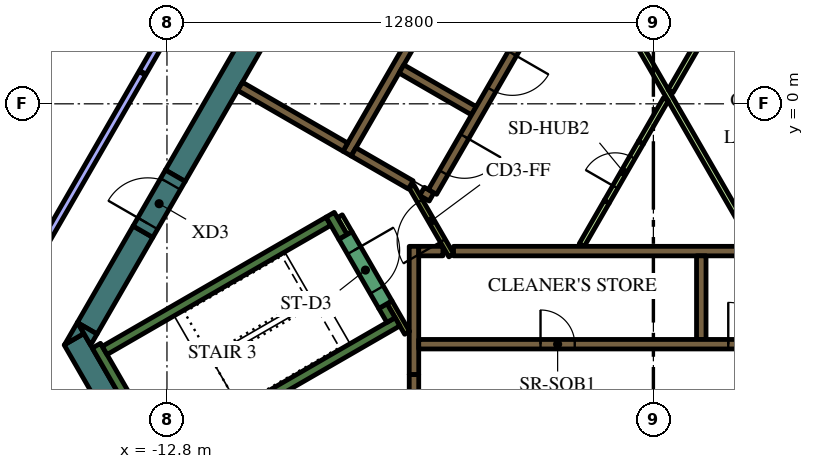
"""IFC4 building model, lengths in metres.
Left out: names, types, materials, properties, quantities, classifications, styles, units other than length and angle.
Written with IfcOpenShell. Run it as: python <this file> out.ifc"""

import sys

from ifc_helpers import new_model, si_unit, direction, frame, frame_2d, origin, place, context, subcontext, project, spatial, polyline, rectangle, outline, extrude, element, fill, save


model = new_model("IFC4")
c1 = context("Model", 3, precision=1e-05, world=origin(), true_north=direction((0.0, 1.0)))
c2 = subcontext(c1, "Body", "Model", "MODEL_VIEW")
j1 = project(units=[si_unit("LENGTHUNIT", "METRE"), si_unit("PLANEANGLEUNIT", "RADIAN")], contexts=[c1])
p1 = place(None, origin())
s1 = spatial("IfcSite", under=j1, at=p1, CompositionType="ELEMENT")
p2 = place(p1, origin())
s2 = spatial("IfcBuilding", under=s1, at=p2, CompositionType="ELEMENT")
p3 = place(p2, frame((0.0, 0.0, 279.6)))
s3 = spatial("IfcBuildingStorey", under=s2, at=p3, CompositionType="ELEMENT", Elevation=279.6)
p4 = place(p3, frame((-13.333, -9.506, 0.0), z_axis=(0.0, 0.0, 1.0), x_axis=(-0.500019073792, 0.866014391245, 0.0)))
e1 = element("IfcWall", 1, at=p4, inside=s3, PredefinedType="SOLIDWALL", context=c2, shape_type="SweptSolid", body=[
    extrude(rectangle(XDim=3.823, YDim=0.6, at=frame_2d((1.912, 0.0))), origin(), (0.0, 0.0, 1.0), 4.2),
])
p5 = place(p3, origin())
e2 = element("IfcWall", 2, at=p5, inside=s3, PredefinedType="SOLIDWALL", context=c2, shape_type="SweptSolid", body=[
    extrude(outline(polyline([(-14.987, -6.043), (-15.493, -6.335), (-15.156, -5.75), (-14.987, -6.043)])), origin(), (0.0, 0.0, 1.0), 4.2),
])
p6 = place(p3, frame((-13.432, -3.364, 0.0), z_axis=(0.0, 0.0, 1.0), x_axis=(-0.499960127962, -0.866048422692, 0.0)))
e3 = element("IfcWall", 3, at=p6, inside=s3, PredefinedType="SOLIDWALL", context=c2, shape_type="SweptSolid", body=[
    extrude(rectangle(XDim=2.934, YDim=0.6, at=frame_2d((1.467, 0.0))), origin(), (0.0, 0.0, 1.0), 4.2),
])
e4 = element("IfcWall", 4, at=p5, inside=s3, PredefinedType="SOLIDWALL", context=c2, shape_type="SweptSolid", body=[
    extrude(outline(polyline([(-14.809, -6.35), (-15.147, -5.764), (-14.64, -6.057), (-14.809, -6.35)])), origin(), (0.0, 0.0, 1.0), 4.2),
])
p7 = place(p3, frame((-4.234, 12.566, 0.0), z_axis=(0.0, 0.0, 1.0), x_axis=(-0.499998841866, -0.866026072432, 0.0)))
e5 = element("IfcWall", 5, at=p7, inside=s3, PredefinedType="SOLIDWALL", context=c2, shape_type="SweptSolid", body=[
    extrude(rectangle(XDim=16.694, YDim=0.6, at=frame_2d((8.347, 0.0))), origin(), (0.0, 0.0, 1.0), 4.2),
])
p8 = place(p3, frame((-12.84, -9.511, 0.0), z_axis=(0.0, 0.0, 1.0), x_axis=(-0.499997733992, 0.866026712061, 0.0)))
e6 = element("IfcWall", 6, at=p8, inside=s3, PredefinedType="SOLIDWALL", context=c2, shape_type="SweptSolid", body=[
    extrude(rectangle(XDim=3.634, YDim=0.25, at=frame_2d((1.817, 0.0))), origin(), (0.0, 0.0, 1.0), 4.2),
])
p9 = place(p3, frame((-14.44, -6.49, 0.0), z_axis=(0.0, 0.0, 1.0), x_axis=(0.866022966069, 0.500004222222, 0.0)))
e7 = element("IfcWall", 7, at=p9, inside=s3, PredefinedType="SOLIDWALL", context=c2, shape_type="SweptSolid", body=[
    extrude(rectangle(XDim=6.8, YDim=0.25, at=frame_2d((3.4, 0.0))), origin(), (0.0, 0.0, 1.0), 4.2),
])
p10 = place(p3, frame((-8.168, -3.503, 0.0), z_axis=(0.0, 0.0, 1.0), x_axis=(-0.499952099219, 0.866053057547, 0.0)))
e8 = element("IfcWall", 8, at=p10, inside=s3, PredefinedType="SOLIDWALL", context=c2, shape_type="SweptSolid", body=[
    extrude(rectangle(XDim=0.675, YDim=0.25, at=frame_2d((0.337, 0.0))), origin(), (0.0, 0.0, 1.0), 4.2),
])
p11 = place(p3, frame((-12.84, -9.261, 0.0), z_axis=(0.0, 0.0, 1.0), x_axis=(0.866016039709, 0.500016218704, 0.0)))
e9 = element("IfcWall", 9, at=p11, inside=s3, PredefinedType="SOLIDWALL", context=c2, shape_type="SweptSolid", body=[
    extrude(rectangle(XDim=7.05, YDim=0.25, at=frame_2d((3.525, 0.0))), origin(), (0.0, 0.0, 1.0), 4.2),
])
p12 = place(p3, frame((-6.905, -5.69, 0.0), z_axis=(0.0, 0.0, 1.0), x_axis=(-0.500402024738, 0.865793170242, 0.0)))
e10 = element("IfcWall", 10, at=p12, inside=s3, PredefinedType="SOLIDWALL", context=c2, shape_type="SweptSolid", body=[
    extrude(rectangle(XDim=0.425, YDim=0.25, at=frame_2d((0.212, 0.0))), origin(), (0.0, 0.0, 1.0), 4.2),
])
p13 = place(p3, frame((-5.259, -3.875, 0.0), z_axis=(0.0, 0.0, 1.0), x_axis=(1.0, 0.0, 0.0)))
e11 = element("IfcWall", 11, at=p13, inside=s3, PredefinedType="SOLIDWALL", context=c2, shape_type="SweptSolid", body=[
    extrude(rectangle(XDim=10.489, YDim=0.25, at=frame_2d((5.244, 0.0))), origin(), (0.0, 0.0, 1.0), 4.2),
])
p14 = place(p3, frame((1.26, -4.0, 0.0), z_axis=(0.0, 0.0, 1.0), x_axis=(0.0, -1.0, 0.0)))
e12 = element("IfcWall", 12, at=p14, inside=s3, PredefinedType="SOLIDWALL", context=c2, shape_type="SweptSolid", body=[
    extrude(rectangle(XDim=2.2, YDim=0.25, at=frame_2d((1.1, 0.0))), origin(), (0.0, 0.0, 1.0), 4.2),
])
p15 = place(p3, frame((-6.3, -7.125, 0.0), z_axis=(0.0, 0.0, 1.0), x_axis=(0.0, 1.0, 0.0)))
e13 = element("IfcWall", 13, at=p15, inside=s3, PredefinedType="SOLIDWALL", context=c2, shape_type="SweptSolid", body=[
    extrude(rectangle(XDim=3.375, YDim=0.25, at=frame_2d((1.687, 0.0))), origin(), (0.0, 0.0, 1.0), 4.2),
])
p16 = place(p3, frame((-6.175, -3.875, 0.0), z_axis=(0.0, 0.0, 1.0), x_axis=(1.0, 0.0, 0.0)))
e14 = element("IfcWall", 14, at=p16, inside=s3, PredefinedType="SOLIDWALL", context=c2, shape_type="SweptSolid", body=[
    extrude(rectangle(XDim=0.637, YDim=0.25, at=frame_2d((0.318, 0.0))), origin(), (0.0, 0.0, 1.0), 4.2),
])
p17 = place(p3, frame((5.97, -2.591, 0.0), z_axis=(0.0, 0.0, 1.0), x_axis=(-0.499994469932, 0.866028596547, 0.0)))
e15 = element("IfcWall", 15, at=p17, inside=s3, PredefinedType="SOLIDWALL", context=c2, shape_type="SweptSolid", body=[
    extrude(rectangle(XDim=10.488, YDim=0.25, at=frame_2d((5.244, 0.0))), origin(), (0.0, 0.0, 1.0), 4.2),
])
p18 = place(p3, frame((-3.02, 7.419, 0.0), z_axis=(0.0, 0.0, 1.0), x_axis=(-0.500022956343, -0.866012149528, 0.0)))
e16 = element("IfcWall", 16, at=p18, inside=s3, PredefinedType="SOLIDWALL", context=c2, shape_type="SweptSolid", body=[
    extrude(rectangle(XDim=10.08, YDim=0.25, at=frame_2d((5.04, 0.0))), origin(), (0.0, 0.0, 1.0), 4.2),
])
p19 = place(p3, frame((-4.724, -0.182, 0.0), z_axis=(0.0, 0.0, 1.0), x_axis=(-0.866008176907, 0.50002983664, 0.0)))
e17 = element("IfcWall", 17, at=p19, inside=s3, PredefinedType="SOLIDWALL", context=c2, shape_type="SweptSolid", body=[
    extrude(rectangle(XDim=2.2, YDim=0.25, at=frame_2d((1.1, 0.0))), origin(), (0.0, 0.0, 1.0), 4.2),
])
p20 = place(p3, frame((-6.088, -2.305, 0.0), z_axis=(0.0, 0.0, 1.0), x_axis=(0.866059450854, -0.499941024108, 0.0)))
e18 = element("IfcWall", 18, at=p20, inside=s3, PredefinedType="SOLIDWALL", context=c2, shape_type="SweptSolid", body=[
    extrude(rectangle(XDim=0.29, YDim=0.25, at=frame_2d((0.145, 0.0))), origin(), (0.0, 0.0, 1.0), 4.2),
])
p21 = place(p3, frame((-7.889, -1.265, 0.0), z_axis=(0.0, 0.0, 1.0), x_axis=(0.865986741702, -0.500066958712, 0.0)))
e19 = element("IfcWall", 19, at=p21, inside=s3, PredefinedType="SOLIDWALL", context=c2, shape_type="SweptSolid", body=[
    extrude(rectangle(XDim=1.738, YDim=0.25, at=frame_2d((0.869, 0.0))), origin(), (0.0, 0.0, 1.0), 4.2),
])
p22 = place(p3, frame((-8.106, -1.14, 0.0), z_axis=(0.0, 0.0, 1.0), x_axis=(-0.866008981251, 0.500028443584, 0.0)))
e20 = element("IfcWall", 20, at=p22, inside=s3, PredefinedType="SOLIDWALL", context=c2, shape_type="SweptSolid", body=[
    extrude(rectangle(XDim=3.2, YDim=0.25, at=frame_2d((1.6, 0.0))), origin(), (0.0, 0.0, 1.0), 4.2),
])
p23 = place(p3, frame((-8.252, -2.958, 0.0), z_axis=(0.0, 0.0, 1.0), x_axis=(0.500174715838, -0.865924508047, 0.0)))
e21 = element("IfcWall", 21, at=p23, inside=s3, PredefinedType="PARTITIONING", context=c2, shape_type="SweptSolid", body=[
    extrude(rectangle(XDim=0.514, YDim=0.15, at=frame_2d((0.257, 0.0))), origin(), (0.0, 0.0, 1.0), 3.55),
])
p24 = place(p3, frame((-6.48, -6.027, 0.0), z_axis=(0.0, 0.0, 1.0), x_axis=(-0.499927229454, 0.866067413802, 0.0)))
e22 = element("IfcWall", 22, at=p24, inside=s3, PredefinedType="PARTITIONING", context=c2, shape_type="SweptSolid", body=[
    extrude(rectangle(XDim=0.929, YDim=0.15, at=frame_2d((0.464, 0.0))), origin(), (0.0, 0.0, 1.0), 4.2),
])
p25 = place(p3, frame((-1.887, 4.168, 0.0), z_axis=(0.0, 0.0, 1.0), x_axis=(0.499997069472, -0.866027095719, 0.0)))
e23 = element("IfcWall", 23, at=p25, inside=s3, PredefinedType="PARTITIONING", context=c2, shape_type="SweptSolid", body=[
    extrude(rectangle(XDim=9.106, YDim=0.15, at=frame_2d((4.553, 0.0))), origin(), (0.0, 0.0, 1.0), 3.55),
])
p26 = place(p3, frame((-0.329, -1.021, 0.0), z_axis=(0.0, 0.0, 1.0), x_axis=(0.500033191285, 0.866006239939, 0.0)))
e24 = element("IfcWall", 24, at=p26, inside=s3, PredefinedType="PARTITIONING", context=c2, shape_type="SweptSolid", body=[
    extrude(rectangle(XDim=1.315, YDim=0.15, at=frame_2d((0.657, 0.0))), origin(), (0.0, 0.0, 1.0), 3.55),
])
p27 = place(p3, frame((2.277, 3.493, 0.0), z_axis=(0.0, 0.0, 1.0), x_axis=(-0.499994550825, -0.866028549844, 0.0)))
e25 = element("IfcWall", 25, at=p27, inside=s3, PredefinedType="PARTITIONING", context=c2, shape_type="SweptSolid", body=[
    extrude(rectangle(XDim=3.65, YDim=0.15, at=frame_2d((1.825, 0.0))), origin(), (0.0, 0.0, 1.0), 3.55),
])
p28 = place(p3, frame((-1.887, -3.718, 0.0), z_axis=(0.0, 0.0, 1.0), x_axis=(0.500033191285, 0.866006239939, 0.0)))
e26 = element("IfcWall", 26, at=p28, inside=s3, PredefinedType="PARTITIONING", context=c2, shape_type="SweptSolid", body=[
    extrude(rectangle(XDim=1.315, YDim=0.15, at=frame_2d((0.657, 0.0))), origin(), (0.0, 0.0, 1.0), 3.55),
])
p29 = place(p3, frame((-6.175, -6.325, 0.0), z_axis=(0.0, 0.0, 1.0), x_axis=(1.0, 0.0, 0.0)))
e27 = element("IfcWall", 27, at=p29, inside=s3, PredefinedType="SOLIDWALL", context=c2, shape_type="SweptSolid", body=[
    extrude(rectangle(XDim=12.35, YDim=0.25, at=frame_2d((6.175, 0.0))), origin(), (0.0, 0.0, 1.0), 4.2),
])
p30 = place(p29, frame((3.205, 0.0, 0.0)))
e28 = element("IfcOpeningElement", 28, at=p30, cuts=e27, PredefinedType="OPENING", context=c2, shape_type="SweptSolid", body=[
    extrude(rectangle(XDim=0.9, YDim=2.1, at=frame_2d((0.45, 1.05))), frame((0.0, 0.135, 0.0), z_axis=(0.0, -1.0, 0.0), x_axis=(1.0, 0.0, 0.0)), (0.0, 0.0, 1.0), 0.27),
])
p31 = place(p29, frame((8.145, 0.0, 0.0)))
e29 = element("IfcOpeningElement", 29, at=p31, cuts=e27, PredefinedType="OPENING", context=c2, shape_type="SweptSolid", body=[
    extrude(rectangle(XDim=1.1, YDim=2.1, at=frame_2d((0.55, 1.05))), frame((0.0, 0.135, 0.0), z_axis=(0.0, -1.0, 0.0), x_axis=(1.0, 0.0, 0.0)), (0.0, 0.0, 1.0), 0.27),
])
p32 = place(p29, frame((10.665, 0.0, 0.0)))
e30 = element("IfcOpeningElement", 30, at=p32, cuts=e27, PredefinedType="OPENING", context=c2, shape_type="SweptSolid", body=[
    extrude(rectangle(XDim=1.1, YDim=2.1, at=frame_2d((0.55, 1.05))), frame((0.0, 0.135, 0.0), z_axis=(0.0, -1.0, 0.0), x_axis=(1.0, 0.0, 0.0)), (0.0, 0.0, 1.0), 0.27),
])
p33 = place(p3, frame((-0.898, 6.194, 0.0), z_axis=(0.0, 0.0, 1.0), x_axis=(-0.499996202215, -0.866027596426, 0.0)))
e31 = element("IfcWall", 31, at=p33, inside=s3, PredefinedType="SOLIDWALL", context=c2, shape_type="SweptSolid", body=[
    extrude(rectangle(XDim=9.83, YDim=0.25, at=frame_2d((4.915, 0.0))), origin(), (0.0, 0.0, 1.0), 4.2),
])
p34 = place(p33, frame((0.585, 0.0, 0.0)))
e32 = element("IfcOpeningElement", 32, at=p34, cuts=e31, PredefinedType="OPENING", context=c2, shape_type="SweptSolid", body=[
    extrude(rectangle(XDim=1.1, YDim=2.1, at=frame_2d((0.55, 1.05))), frame((0.0, 0.135, 0.0), z_axis=(0.0, -1.0, 0.0), x_axis=(1.0, 0.0, 0.0)), (0.0, 0.0, 1.0), 0.27),
])
p35 = place(p33, frame((3.105, 0.0, 0.0)))
e33 = element("IfcOpeningElement", 33, at=p35, cuts=e31, PredefinedType="OPENING", context=c2, shape_type="SweptSolid", body=[
    extrude(rectangle(XDim=1.1, YDim=2.1, at=frame_2d((0.55, 1.05))), frame((0.0, 0.135, 0.0), z_axis=(0.0, -1.0, 0.0), x_axis=(1.0, 0.0, 0.0)), (0.0, 0.0, 1.0), 0.27),
])
p36 = place(p33, frame((5.625, 0.0, 0.0)))
e34 = element("IfcOpeningElement", 34, at=p36, cuts=e31, PredefinedType="OPENING", context=c2, shape_type="SweptSolid", body=[
    extrude(rectangle(XDim=1.1, YDim=2.1, at=frame_2d((0.55, 1.05))), frame((0.0, 0.135, 0.0), z_axis=(0.0, -1.0, 0.0), x_axis=(1.0, 0.0, 0.0)), (0.0, 0.0, 1.0), 0.27),
])
p37 = place(p33, frame((8.145, 0.0, 0.0)))
e35 = element("IfcOpeningElement", 35, at=p37, cuts=e31, PredefinedType="OPENING", context=c2, shape_type="SweptSolid", body=[
    extrude(rectangle(XDim=1.1, YDim=2.1, at=frame_2d((0.55, 1.05))), frame((0.0, 0.135, 0.0), z_axis=(0.0, -1.0, 0.0), x_axis=(1.0, 0.0, 0.0)), (0.0, 0.0, 1.0), 0.27),
])
p38 = place(p3, frame((-8.103, -3.466, 0.0), z_axis=(0.0, 0.0, 1.0), x_axis=(0.500078061341, -0.865980330357, 0.0)))
e36 = element("IfcWall", 36, at=p38, inside=s3, PredefinedType="SOLIDWALL", context=c2, shape_type="SweptSolid", body=[
    extrude(rectangle(XDim=2.1, YDim=0.4, at=frame_2d((1.05, 0.0))), origin(), (0.0, 0.0, 1.0), 4.2),
])
p39 = place(p38, frame((0.45, 0.0, 0.0)))
e37 = element("IfcOpeningElement", 37, at=p39, cuts=e36, PredefinedType="OPENING", context=c2, shape_type="SweptSolid", body=[
    extrude(rectangle(XDim=1.2, YDim=2.1, at=frame_2d((0.6, 1.05))), frame((0.0, 0.21, 0.0), z_axis=(0.0, -1.0, 0.0), x_axis=(1.0, 0.0, 0.0)), (0.0, 0.0, 1.0), 0.42),
])
p40 = place(p3, frame((-6.3, -7.125, 0.0), z_axis=(0.0, 0.0, 1.0), x_axis=(0.0, -1.0, 0.0)))
e38 = element("IfcWall", 38, at=p40, inside=s3, PredefinedType="SOLIDWALL", context=c2, shape_type="SweptSolid", body=[
    extrude(rectangle(XDim=1.8, YDim=0.25, at=frame_2d((0.9, 0.0))), origin(), (0.0, 0.0, 1.0), 4.2),
])
p41 = place(p40, frame((0.45, 0.0, 0.0)))
e39 = element("IfcOpeningElement", 39, at=p41, cuts=e38, PredefinedType="OPENING", context=c2, shape_type="SweptSolid", body=[
    extrude(rectangle(XDim=0.9, YDim=2.1, at=frame_2d((0.45, 1.05))), frame((0.0, 0.135, 0.0), z_axis=(0.0, -1.0, 0.0), x_axis=(1.0, 0.0, 0.0)), (0.0, 0.0, 1.0), 0.27),
])
p42 = place(p3, frame((-5.317, -3.99, 0.0), z_axis=(0.0, 0.0, 1.0), x_axis=(-0.500027713859, 0.866009402589, 0.0)))
e40 = element("IfcWall", 40, at=p42, inside=s3, PredefinedType="PARTITIONING", context=c2, shape_type="SweptSolid", body=[
    extrude(rectangle(XDim=2.1, YDim=0.15, at=frame_2d((1.05, 0.0))), origin(), (0.0, 0.0, 1.0), 4.2),
])
p43 = place(p42, frame((0.45, 0.0, 0.0)))
e41 = element("IfcOpeningElement", 41, at=p43, cuts=e40, PredefinedType="OPENING", context=c2, shape_type="SweptSolid", body=[
    extrude(rectangle(XDim=1.2, YDim=2.1, at=frame_2d((0.6, 1.05))), frame((0.0, 0.085, 0.0), z_axis=(0.0, -1.0, 0.0), x_axis=(1.0, 0.0, 0.0)), (0.0, 0.0, 1.0), 0.17),
])
p44 = place(p3, frame((-13.432, -3.364, 0.0), z_axis=(0.0, 0.0, 1.0), x_axis=(0.500000056704, 0.866025371046, 0.0)))
e42 = element("IfcWall", 42, at=p44, inside=s3, PredefinedType="SOLIDWALL", context=c2, shape_type="SweptSolid", body=[
    extrude(rectangle(XDim=1.7, YDim=0.6, at=frame_2d((0.85, 0.0))), origin(), (0.0, 0.0, 1.0), 4.2),
])
p45 = place(p44, frame((0.25, 0.0, 0.0)))
e43 = element("IfcOpeningElement", 43, at=p45, cuts=e42, PredefinedType="OPENING", context=c2, shape_type="SweptSolid", body=[
    extrude(rectangle(XDim=1.2, YDim=2.1, at=frame_2d((0.6, 1.05))), frame((0.0, 0.31, 0.0), z_axis=(0.0, -1.0, 0.0), x_axis=(1.0, 0.0, 0.0)), (0.0, 0.0, 1.0), 0.62),
])
p46 = place(p3, frame((-1.229, -2.579, 0.0), z_axis=(0.0, 0.0, 1.0), x_axis=(0.500062916607, 0.865989075817, 0.0)))
e44 = element("IfcWall", 44, at=p46, inside=s3, PredefinedType="PARTITIONING", context=c2, shape_type="SweptSolid", body=[
    extrude(rectangle(XDim=1.8, YDim=0.15, at=frame_2d((0.9, 0.0))), origin(), (0.0, 0.0, 1.0), 3.55),
])
p47 = place(p46, frame((0.45, 0.0, 0.0)))
e45 = element("IfcOpeningElement", 45, at=p47, cuts=e44, PredefinedType="OPENING", context=c2, shape_type="SweptSolid", body=[
    extrude(rectangle(XDim=0.9, YDim=2.1, at=frame_2d((0.45, 1.05))), frame((0.0, 0.085, 0.0), z_axis=(0.0, -1.0, 0.0), x_axis=(1.0, 0.0, 0.0)), (0.0, 0.0, 1.0), 0.17),
])
p48 = place(p3, frame((-17.497, -0.613, 0.0), z_axis=(0.0, 0.0, 1.0), x_axis=(0.447480081559, 0.89429389834, 0.0)))
e46 = element("IfcWall", 46, at=p48, inside=s3, PredefinedType="PARTITIONING", context=c2, shape_type="SweptSolid", body=[
    extrude(rectangle(XDim=5.863, YDim=0.15, at=frame_2d((2.931, 0.0))), origin(), (0.0, 0.0, 1.0), 3.55),
])
p49 = place(p48, frame((2.463, 0.0, 0.0)))
e47 = element("IfcOpeningElement", 47, at=p49, cuts=e46, PredefinedType="OPENING", context=c2, shape_type="SweptSolid", body=[
    extrude(rectangle(XDim=0.9, YDim=2.1, at=frame_2d((0.45, 1.05))), frame((0.0, 0.085, 0.0), z_axis=(0.0, -1.0, 0.0), x_axis=(1.0, 0.0, 0.0)), (0.0, 0.0, 1.0), 0.17),
])
p50 = place(p3, frame((-7.436, 11.221, 0.0), z_axis=(0.0, 0.0, 1.0), x_axis=(-0.49999894854, -0.866026010844, 0.0)))
e48 = element("IfcWall", 48, at=p50, inside=s3, PredefinedType="PARTITIONING", context=c2, shape_type="SweptSolid", body=[
    extrude(rectangle(XDim=12.0, YDim=0.2, at=frame_2d((6.0, 0.0))), origin(), (0.0, 0.0, 1.0), 3.55),
])
p51 = place(p50, frame((5.5, 0.0, 0.0)))
e49 = element("IfcOpeningElement", 49, at=p51, cuts=e48, PredefinedType="OPENING", context=c2, shape_type="SweptSolid", body=[
    extrude(rectangle(XDim=1.0, YDim=2.1, at=frame_2d((0.5, 1.05))), frame((0.0, 0.11, 0.0), z_axis=(0.0, -1.0, 0.0), x_axis=(1.0, 0.0, 0.0)), (0.0, 0.0, 1.0), 0.22),
])
p52 = place(p3, frame((-13.451, 0.803, 0.0), z_axis=(0.0, 0.0, 1.0), x_axis=(-0.499982585408, -0.86603545787, 0.0)))
e50 = element("IfcWall", 50, at=p52, inside=s3, PredefinedType="PARTITIONING", context=c2, shape_type="SweptSolid", body=[
    extrude(rectangle(XDim=8.26, YDim=0.2, at=frame_2d((4.13, 0.0))), origin(), (0.0, 0.0, 1.0), 3.55),
])
p53 = place(p3, frame((-17.218, -6.978, 0.0), z_axis=(0.0, 0.0, 1.0), x_axis=(0.500012299885, -0.866018302326, 0.0)))
e51 = element("IfcWall", 51, at=p53, inside=s3, PredefinedType="PARTITIONING", context=c2, shape_type="SweptSolid", body=[
    extrude(rectangle(XDim=5.857, YDim=0.2, at=frame_2d((2.929, 0.0))), origin(), (0.0, 0.0, 1.0), 3.55),
])
p54 = place(p30, origin())
e52 = element("IfcDoor", 52, at=p54, inside=s3, OperationType="SINGLE_SWING_LEFT", PredefinedType="DOOR", context=c2, shape_type="SweptSolid", body=[
    extrude(rectangle(XDim=0.9, YDim=2.1, at=frame_2d((0.45, 1.05))), frame((0.0, 0.025, 0.0), z_axis=(0.0, -1.0, 0.0), x_axis=(1.0, 0.0, 0.0)), (0.0, 0.0, 1.0), 0.05),
])
fill(e28, e52)
p55 = place(p31, origin())
e53 = element("IfcDoor", 53, at=p55, inside=s3, OperationType="DOUBLE_DOOR_SLIDING", PredefinedType="DOOR", context=c2, shape_type="SweptSolid", body=[
    extrude(rectangle(XDim=1.1, YDim=2.1, at=frame_2d((0.55, 1.05))), frame((0.0, 0.025, 0.0), z_axis=(0.0, -1.0, 0.0), x_axis=(1.0, 0.0, 0.0)), (0.0, 0.0, 1.0), 0.05),
])
fill(e29, e53)
p56 = place(p36, origin())
e54 = element("IfcDoor", 54, at=p56, inside=s3, OperationType="DOUBLE_DOOR_SLIDING", PredefinedType="DOOR", context=c2, shape_type="SweptSolid", body=[
    extrude(rectangle(XDim=1.1, YDim=2.1, at=frame_2d((0.55, 1.05))), frame((0.0, 0.025, 0.0), z_axis=(0.0, -1.0, 0.0), x_axis=(1.0, 0.0, 0.0)), (0.0, 0.0, 1.0), 0.05),
])
fill(e34, e54)
p57 = place(p37, origin())
e55 = element("IfcDoor", 55, at=p57, inside=s3, OperationType="DOUBLE_DOOR_SLIDING", PredefinedType="DOOR", context=c2, shape_type="SweptSolid", body=[
    extrude(rectangle(XDim=1.1, YDim=2.1, at=frame_2d((0.55, 1.05))), frame((0.0, 0.025, 0.0), z_axis=(0.0, -1.0, 0.0), x_axis=(1.0, 0.0, 0.0)), (0.0, 0.0, 1.0), 0.05),
])
fill(e35, e55)
p58 = place(p39, origin())
e56 = element("IfcDoor", 56, at=p58, inside=s3, OperationType="SINGLE_SWING_LEFT", PredefinedType="DOOR", context=c2, shape_type="SweptSolid", body=[
    extrude(rectangle(XDim=1.2, YDim=2.1, at=frame_2d((0.6, 1.05))), frame((0.0, 0.025, 0.0), z_axis=(0.0, -1.0, 0.0), x_axis=(1.0, 0.0, 0.0)), (0.0, 0.0, 1.0), 0.05),
])
fill(e37, e56)
p59 = place(p43, origin())
e57 = element("IfcDoor", 57, at=p59, inside=s3, OperationType="SINGLE_SWING_LEFT", PredefinedType="DOOR", context=c2, shape_type="SweptSolid", body=[
    extrude(rectangle(XDim=1.2, YDim=2.1, at=frame_2d((0.6, 1.05))), frame((0.0, 0.025, 0.0), z_axis=(0.0, -1.0, 0.0), x_axis=(1.0, 0.0, 0.0)), (0.0, 0.0, 1.0), 0.05),
])
fill(e41, e57)
p60 = place(p45, origin())
e58 = element("IfcDoor", 58, at=p60, inside=s3, OperationType="SINGLE_SWING_LEFT", PredefinedType="DOOR", context=c2, shape_type="SweptSolid", body=[
    extrude(rectangle(XDim=1.2, YDim=2.1, at=frame_2d((0.6, 1.05))), frame((0.0, 0.025, 0.0), z_axis=(0.0, -1.0, 0.0), x_axis=(1.0, 0.0, 0.0)), (0.0, 0.0, 1.0), 0.05),
])
fill(e43, e58)
p61 = place(p47, origin())
e59 = element("IfcDoor", 59, at=p61, inside=s3, OperationType="SINGLE_SWING_LEFT", PredefinedType="DOOR", context=c2, shape_type="SweptSolid", body=[
    extrude(rectangle(XDim=0.9, YDim=2.1, at=frame_2d((0.45, 1.05))), frame((0.0, 0.025, 0.0), z_axis=(0.0, -1.0, 0.0), x_axis=(1.0, 0.0, 0.0)), (0.0, 0.0, 1.0), 0.05),
])
fill(e45, e59)
save(model, sys.argv[1])
